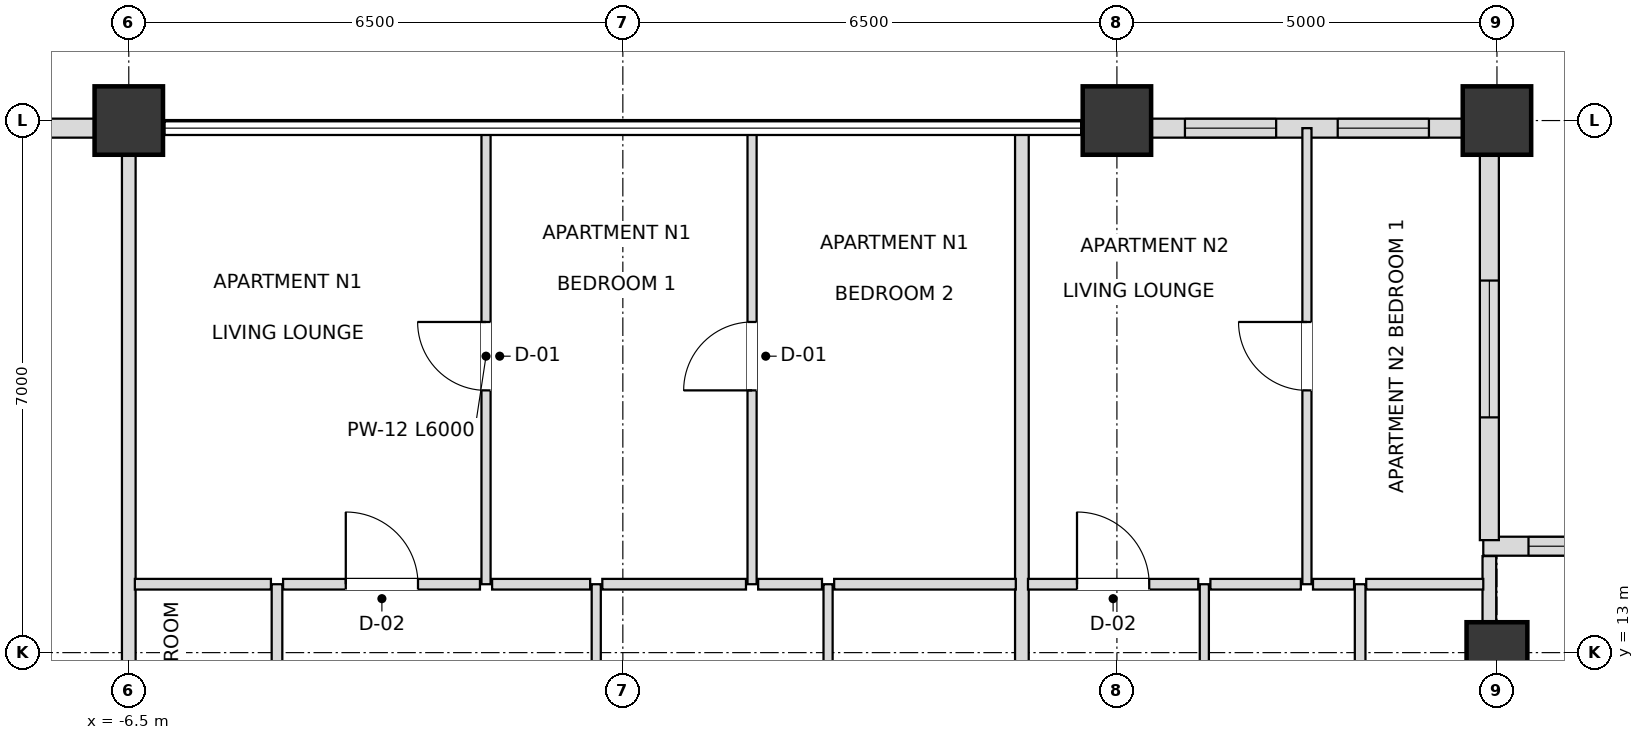
"""IFC4 building model, lengths in metres.
Left out: names, types, materials, properties, quantities, classifications, styles, units other than length and angle.
Written with IfcOpenShell. Run it as: python <this file> out.ifc"""

import sys

from ifc_helpers import new_model, si_unit, direction, frame, frame_2d, origin, origin_2d, place, context, subcontext, project, spatial, rectangle, extrude, element, fill, save


model = new_model("IFC4")
c1 = context("Model", 3, precision=1e-05, world=origin(), true_north=direction((0.0, 1.0)))
c2 = subcontext(c1, "Body", "Model", "MODEL_VIEW")
j1 = project(units=[si_unit("LENGTHUNIT", "METRE"), si_unit("PLANEANGLEUNIT", "RADIAN")], contexts=[c1])
p1 = place(None, origin())
s1 = spatial("IfcSite", under=j1, at=p1, CompositionType="ELEMENT")
p2 = place(p1, origin())
s2 = spatial("IfcBuilding", under=s1, at=p2, CompositionType="ELEMENT")
p3 = place(p2, frame((0.0, 0.0, 276.3)))
s3 = spatial("IfcBuildingStorey", under=s2, at=p3, CompositionType="ELEMENT", Elevation=276.3)
for number, where, z_axis, x_axis in (
    (1, (11.5, 20.0, 0.0), (0.0, 0.0, 1.0), (1.0, 0.0, 0.0)),
    (2, (6.5, 20.0, 0.0), (0.0, 0.0, 1.0), (1.0, 0.0, 0.0)),
    (3, (-6.5, 20.0, 0.0), (0.0, 0.0, 1.0), (1.0, 0.0, 0.0)),
):
    element("IfcColumn", number, at=place(p3, frame(where, z_axis=z_axis, x_axis=x_axis)), inside=s3, PredefinedType="USERDEFINED", context=c2, shape_type="SweptSolid", body=[
        extrude(rectangle(XDim=0.9, YDim=0.9, at=origin_2d()), origin(), (0.0, 0.0, 1.0), 3.6),
    ])
p4 = place(p3, frame((11.5, 13.0, 0.0), z_axis=(0.0, 0.0, 1.0), x_axis=(1.0, 0.0, 0.0)))
e4 = element("IfcColumn", 4, at=p4, inside=s3, PredefinedType="COLUMN", context=c2, shape_type="SweptSolid", body=[
    extrude(rectangle(XDim=0.8, YDim=0.8, at=origin_2d()), origin(), (0.0, 0.0, 1.0), 3.6),
])
p5 = place(p3, frame((11.055, 19.9, 0.0), z_axis=(0.0, 0.0, 1.0), x_axis=(-1.0, 0.0, 0.0)))
e5 = element("IfcWall", 5, at=p5, inside=s3, PredefinedType="SOLIDWALL", context=c2, shape_type="SweptSolid", body=[
    extrude(rectangle(XDim=4.11, YDim=0.25, at=frame_2d((2.055, 0.0))), origin(), (0.0, 0.0, 1.0), 2.748),
])
p6 = place(p5, frame((0.45, 0.0, 0.72)))
e6 = element("IfcOpeningElement", 6, at=p6, cuts=e5, PredefinedType="OPENING", context=c2, shape_type="SweptSolid", body=[
    extrude(rectangle(XDim=1.2, YDim=1.68, at=frame_2d((0.6, 0.84))), frame((0.0, 0.135, 0.0), z_axis=(0.0, -1.0, 0.0), x_axis=(1.0, 0.0, 0.0)), (0.0, 0.0, 1.0), 0.27),
])
p7 = place(p5, frame((2.46, 0.0, 0.72)))
e7 = element("IfcOpeningElement", 7, at=p7, cuts=e5, PredefinedType="OPENING", context=c2, shape_type="SweptSolid", body=[
    extrude(rectangle(XDim=1.2, YDim=1.68, at=frame_2d((0.6, 0.84))), frame((0.0, 0.135, 0.0), z_axis=(0.0, -1.0, 0.0), x_axis=(1.0, 0.0, 0.0)), (0.0, 0.0, 1.0), 0.27),
])
p8 = place(p3, frame((-6.945, 19.9, 0.0), z_axis=(0.0, 0.0, 1.0), x_axis=(-1.0, 0.0, 0.0)))
e8 = element("IfcWall", 8, at=p8, inside=s3, PredefinedType="SOLIDWALL", context=c2, shape_type="SweptSolid", body=[
    extrude(rectangle(XDim=4.11, YDim=0.25, at=frame_2d((2.055, 0.0))), origin(), (0.0, 0.0, 1.0), 2.748),
])
p9 = place(p8, frame((1.155, 0.0, 0.72)))
e9 = element("IfcOpeningElement", 9, at=p9, cuts=e8, PredefinedType="OPENING", context=c2, shape_type="SweptSolid", body=[
    extrude(rectangle(XDim=1.8, YDim=1.68, at=frame_2d((0.9, 0.84))), frame((0.0, 0.135, 0.0), z_axis=(0.0, -1.0, 0.0), x_axis=(1.0, 0.0, 0.0)), (0.0, 0.0, 1.0), 0.27),
])
p10 = place(p3, frame((16.98, 14.4, 0.0), z_axis=(0.0, 0.0, 1.0), x_axis=(-1.0, 0.0, 0.0)))
e10 = element("IfcWall", 10, at=p10, inside=s3, PredefinedType="SOLIDWALL", context=c2, shape_type="SweptSolid", body=[
    extrude(rectangle(XDim=5.66, YDim=0.25, at=frame_2d((2.83, 0.0))), origin(), (0.0, 0.0, 1.0), 2.748),
])
p11 = place(p10, frame((0.595, 0.0, 0.72)))
e11 = element("IfcOpeningElement", 11, at=p11, cuts=e10, PredefinedType="OPENING", context=c2, shape_type="SweptSolid", body=[
    extrude(rectangle(XDim=1.8, YDim=1.68, at=frame_2d((0.9, 0.84))), frame((0.0, 0.135, 0.0), z_axis=(0.0, -1.0, 0.0), x_axis=(1.0, 0.0, 0.0)), (0.0, 0.0, 1.0), 0.27),
])
p12 = place(p10, frame((3.265, 0.0, 0.72)))
e12 = element("IfcOpeningElement", 12, at=p12, cuts=e10, PredefinedType="OPENING", context=c2, shape_type="SweptSolid", body=[
    extrude(rectangle(XDim=1.8, YDim=1.68, at=frame_2d((0.9, 0.84))), frame((0.0, 0.135, 0.0), z_axis=(0.0, -1.0, 0.0), x_axis=(1.0, 0.0, 0.0)), (0.0, 0.0, 1.0), 0.27),
])
p13 = place(p3, frame((11.4, 14.48, 0.0), z_axis=(0.0, 0.0, 1.0), x_axis=(0.0, 1.0, 0.0)))
e13 = element("IfcWall", 13, at=p13, inside=s3, PredefinedType="SOLIDWALL", context=c2, shape_type="SweptSolid", body=[
    extrude(rectangle(XDim=5.34, YDim=0.25, at=frame_2d((2.67, 0.0))), origin(), (0.0, 0.0, 1.0), 2.748),
])
p14 = place(p13, frame((1.615, 0.0, 0.72)))
e14 = element("IfcOpeningElement", 14, at=p14, cuts=e13, PredefinedType="OPENING", context=c2, shape_type="SweptSolid", body=[
    extrude(rectangle(XDim=1.8, YDim=1.68, at=frame_2d((0.9, 0.84))), frame((0.0, 0.135, 0.0), z_axis=(0.0, -1.0, 0.0), x_axis=(1.0, 0.0, 0.0)), (0.0, 0.0, 1.0), 0.27),
])
p15 = place(p3, frame((-6.5, 9.2, 0.0), z_axis=(0.0, 0.0, 1.0), x_axis=(0.0, 1.0, 0.0)))
e15 = element("IfcWall", 15, at=p15, inside=s3, PredefinedType="PARTITIONING", context=c2, shape_type="SweptSolid", body=[
    extrude(rectangle(XDim=10.7, YDim=0.18, at=frame_2d((5.35, 0.0))), origin(), (0.0, 0.0, 1.0), 2.826),
])
p16 = place(p3, frame((-4.55, 9.2, 0.0), z_axis=(0.0, 0.0, 1.0), x_axis=(0.0, 1.0, 0.0)))
e16 = element("IfcWall", 16, at=p16, inside=s3, PredefinedType="PARTITIONING", context=c2, shape_type="SweptSolid", body=[
    extrude(rectangle(XDim=4.7, YDim=0.14, at=frame_2d((2.35, 0.0))), origin(), (0.0, 0.0, 1.0), 3.38),
])
p17 = place(p16, frame((1.9, 0.0, 0.0)))
e17 = element("IfcOpeningElement", 17, at=p17, cuts=e16, PredefinedType="OPENING", context=c2, shape_type="SweptSolid", body=[
    extrude(rectangle(XDim=0.9, YDim=2.1, at=frame_2d((0.45, 1.05))), frame((0.0, 0.08, 0.0), z_axis=(0.0, -1.0, 0.0), x_axis=(1.0, 0.0, 0.0)), (0.0, 0.0, 1.0), 0.16),
])
p18 = place(p3, frame((-1.8, 13.9, 0.0), z_axis=(0.0, 0.0, 1.0), x_axis=(0.0, 1.0, 0.0)))
e18 = element("IfcWall", 18, at=p18, inside=s3, PredefinedType="PARTITIONING", context=c2, shape_type="SweptSolid", body=[
    extrude(rectangle(XDim=6.0, YDim=0.12, at=frame_2d((3.0, 0.0))), origin(), (0.0, 0.0, 1.0), 3.018),
])
p19 = place(p18, frame((2.55, 0.0, 0.0)))
e19 = element("IfcOpeningElement", 19, at=p19, cuts=e18, PredefinedType="OPENING", context=c2, shape_type="SweptSolid", body=[
    extrude(rectangle(XDim=0.9, YDim=2.1, at=frame_2d((0.45, 1.05))), frame((0.0, 0.07, 0.0), z_axis=(0.0, -1.0, 0.0), x_axis=(1.0, 0.0, 0.0)), (0.0, 0.0, 1.0), 0.14),
])
p20 = place(p3, frame((-0.35, 9.2, 0.0), z_axis=(0.0, 0.0, 1.0), x_axis=(0.0, 1.0, 0.0)))
e20 = element("IfcWall", 20, at=p20, inside=s3, PredefinedType="PARTITIONING", context=c2, shape_type="SweptSolid", body=[
    extrude(rectangle(XDim=4.7, YDim=0.12, at=frame_2d((2.35, 0.0))), origin(), (0.0, 0.0, 1.0), 3.38),
])
p21 = place(p20, frame((1.875, 0.0, 0.0)))
e21 = element("IfcOpeningElement", 21, at=p21, cuts=e20, PredefinedType="OPENING", context=c2, shape_type="SweptSolid", body=[
    extrude(rectangle(XDim=0.95, YDim=2.1, at=frame_2d((0.475, 1.05))), frame((0.0, 0.07, 0.0), z_axis=(0.0, -1.0, 0.0), x_axis=(1.0, 0.0, 0.0)), (0.0, 0.0, 1.0), 0.14),
])
p22 = place(p3, frame((1.7, 13.9, 0.0), z_axis=(0.0, 0.0, 1.0), x_axis=(0.0, 1.0, 0.0)))
e22 = element("IfcWall", 22, at=p22, inside=s3, PredefinedType="PARTITIONING", context=c2, shape_type="SweptSolid", body=[
    extrude(rectangle(XDim=6.0, YDim=0.12, at=frame_2d((3.0, 0.0))), origin(), (0.0, 0.0, 1.0), 3.018),
])
p23 = place(p22, frame((2.55, 0.0, 0.0)))
e23 = element("IfcOpeningElement", 23, at=p23, cuts=e22, PredefinedType="OPENING", context=c2, shape_type="SweptSolid", body=[
    extrude(rectangle(XDim=0.9, YDim=2.1, at=frame_2d((0.45, 1.05))), frame((0.0, 0.07, 0.0), z_axis=(0.0, -1.0, 0.0), x_axis=(1.0, 0.0, 0.0)), (0.0, 0.0, 1.0), 0.14),
])
p24 = place(p3, frame((2.7, 9.2, 0.0), z_axis=(0.0, 0.0, 1.0), x_axis=(0.0, 1.0, 0.0)))
e24 = element("IfcWall", 24, at=p24, inside=s3, PredefinedType="PARTITIONING", context=c2, shape_type="SweptSolid", body=[
    extrude(rectangle(XDim=4.7, YDim=0.12, at=frame_2d((2.35, 0.0))), origin(), (0.0, 0.0, 1.0), 3.38),
])
p25 = place(p24, frame((1.9, 0.0, 0.0)))
e25 = element("IfcOpeningElement", 25, at=p25, cuts=e24, PredefinedType="OPENING", context=c2, shape_type="SweptSolid", body=[
    extrude(rectangle(XDim=0.9, YDim=2.1, at=frame_2d((0.45, 1.05))), frame((0.0, 0.07, 0.0), z_axis=(0.0, -1.0, 0.0), x_axis=(1.0, 0.0, 0.0)), (0.0, 0.0, 1.0), 0.14),
])
p26 = place(p3, frame((5.25, 9.2, 0.0), z_axis=(0.0, 0.0, 1.0), x_axis=(0.0, 1.0, 0.0)))
e26 = element("IfcWall", 26, at=p26, inside=s3, PredefinedType="PARTITIONING", context=c2, shape_type="SweptSolid", body=[
    extrude(rectangle(XDim=10.7, YDim=0.18, at=frame_2d((5.35, 0.0))), origin(), (0.0, 0.0, 1.0), 3.018),
])
p27 = place(p3, frame((7.65, 9.2, 0.0), z_axis=(0.0, 0.0, 1.0), x_axis=(0.0, 1.0, 0.0)))
e27 = element("IfcWall", 27, at=p27, inside=s3, PredefinedType="PARTITIONING", context=c2, shape_type="SweptSolid", body=[
    extrude(rectangle(XDim=4.7, YDim=0.12, at=frame_2d((2.35, 0.0))), origin(), (0.0, 0.0, 1.0), 2.826),
])
p28 = place(p27, frame((1.875, 0.0, 0.0)))
e28 = element("IfcOpeningElement", 28, at=p28, cuts=e27, PredefinedType="OPENING", context=c2, shape_type="SweptSolid", body=[
    extrude(rectangle(XDim=0.95, YDim=2.1, at=frame_2d((0.475, 1.05))), frame((0.0, 0.07, 0.0), z_axis=(0.0, -1.0, 0.0), x_axis=(1.0, 0.0, 0.0)), (0.0, 0.0, 1.0), 0.14),
])
p29 = place(p3, frame((9.0, 13.9, 0.0), z_axis=(0.0, 0.0, 1.0), x_axis=(0.0, 1.0, 0.0)))
e29 = element("IfcWall", 29, at=p29, inside=s3, PredefinedType="PARTITIONING", context=c2, shape_type="SweptSolid", body=[
    extrude(rectangle(XDim=6.0, YDim=0.12, at=frame_2d((3.0, 0.0))), origin(), (0.0, 0.0, 1.0), 3.38),
])
p30 = place(p29, frame((2.55, 0.0, 0.0)))
e30 = element("IfcOpeningElement", 30, at=p30, cuts=e29, PredefinedType="OPENING", context=c2, shape_type="SweptSolid", body=[
    extrude(rectangle(XDim=0.9, YDim=2.1, at=frame_2d((0.45, 1.05))), frame((0.0, 0.07, 0.0), z_axis=(0.0, -1.0, 0.0), x_axis=(1.0, 0.0, 0.0)), (0.0, 0.0, 1.0), 0.14),
])
p31 = place(p3, frame((9.7, 9.2, 0.0), z_axis=(0.0, 0.0, 1.0), x_axis=(0.0, 1.0, 0.0)))
e31 = element("IfcWall", 31, at=p31, inside=s3, PredefinedType="PARTITIONING", context=c2, shape_type="SweptSolid", body=[
    extrude(rectangle(XDim=4.7, YDim=0.14, at=frame_2d((2.35, 0.0))), origin(), (0.0, 0.0, 1.0), 2.826),
])
p32 = place(p31, frame((1.9, 0.0, 0.0)))
e32 = element("IfcOpeningElement", 32, at=p32, cuts=e31, PredefinedType="OPENING", context=c2, shape_type="SweptSolid", body=[
    extrude(rectangle(XDim=0.9, YDim=2.1, at=frame_2d((0.45, 1.05))), frame((0.0, 0.08, 0.0), z_axis=(0.0, -1.0, 0.0), x_axis=(1.0, 0.0, 0.0)), (0.0, 0.0, 1.0), 0.16),
])
p33 = place(p3, frame((11.4, 9.2, 0.0), z_axis=(0.0, 0.0, 1.0), x_axis=(0.0, 1.0, 0.0)))
e33 = element("IfcWall", 33, at=p33, inside=s3, PredefinedType="PARTITIONING", context=c2, shape_type="SweptSolid", body=[
    extrude(rectangle(XDim=5.07, YDim=0.18, at=frame_2d((2.535, 0.0))), origin(), (0.0, 0.0, 1.0), 2.748),
])
p34 = place(p3, frame((-6.42, 13.9, 0.0), z_axis=(0.0, 0.0, 1.0), x_axis=(1.0, 0.0, 0.0)))
e34 = element("IfcWall", 34, at=p34, inside=s3, PredefinedType="PARTITIONING", context=c2, shape_type="SweptSolid", body=[
    extrude(rectangle(XDim=1.79, YDim=0.14, at=frame_2d((0.895, 0.0))), origin(), (0.0, 0.0, 1.0), 3.38),
])
p35 = place(p3, frame((-4.47, 13.9, 0.0), z_axis=(0.0, 0.0, 1.0), x_axis=(1.0, 0.0, 0.0)))
e35 = element("IfcWall", 35, at=p35, inside=s3, PredefinedType="PARTITIONING", context=c2, shape_type="SweptSolid", body=[
    extrude(rectangle(XDim=2.59, YDim=0.14, at=frame_2d((1.295, 0.0))), origin(), (0.0, 0.0, 1.0), 3.38),
])
p36 = place(p35, frame((0.825, 0.0, 0.0)))
e36 = element("IfcOpeningElement", 36, at=p36, cuts=e35, PredefinedType="OPENING", context=c2, shape_type="SweptSolid", body=[
    extrude(rectangle(XDim=0.95, YDim=2.1, at=frame_2d((0.475, 1.05))), frame((0.0, 0.08, 0.0), z_axis=(0.0, -1.0, 0.0), x_axis=(1.0, 0.0, 0.0)), (0.0, 0.0, 1.0), 0.16),
])
p37 = place(p3, frame((-1.72, 13.9, 0.0), z_axis=(0.0, 0.0, 1.0), x_axis=(1.0, 0.0, 0.0)))
e37 = element("IfcWall", 37, at=p37, inside=s3, PredefinedType="PARTITIONING", context=c2, shape_type="SweptSolid", body=[
    extrude(rectangle(XDim=1.29, YDim=0.14, at=frame_2d((0.645, 0.0))), origin(), (0.0, 0.0, 1.0), 3.38),
])
p38 = place(p3, frame((-0.27, 13.9, 0.0), z_axis=(0.0, 0.0, 1.0), x_axis=(1.0, 0.0, 0.0)))
e38 = element("IfcWall", 38, at=p38, inside=s3, PredefinedType="PARTITIONING", context=c2, shape_type="SweptSolid", body=[
    extrude(rectangle(XDim=1.89, YDim=0.14, at=frame_2d((0.945, 0.0))), origin(), (0.0, 0.0, 1.0), 3.38),
])
p39 = place(p3, frame((1.78, 13.9, 0.0), z_axis=(0.0, 0.0, 1.0), x_axis=(1.0, 0.0, 0.0)))
e39 = element("IfcWall", 39, at=p39, inside=s3, PredefinedType="PARTITIONING", context=c2, shape_type="SweptSolid", body=[
    extrude(rectangle(XDim=0.84, YDim=0.14, at=frame_2d((0.42, 0.0))), origin(), (0.0, 0.0, 1.0), 3.38),
])
p40 = place(p3, frame((2.78, 13.9, 0.0), z_axis=(0.0, 0.0, 1.0), x_axis=(1.0, 0.0, 0.0)))
e40 = element("IfcWall", 40, at=p40, inside=s3, PredefinedType="PARTITIONING", context=c2, shape_type="SweptSolid", body=[
    extrude(rectangle(XDim=2.39, YDim=0.14, at=frame_2d((1.195, 0.0))), origin(), (0.0, 0.0, 1.0), 3.38),
])
p41 = place(p3, frame((5.33, 13.9, 0.0), z_axis=(0.0, 0.0, 1.0), x_axis=(1.0, 0.0, 0.0)))
e41 = element("IfcWall", 41, at=p41, inside=s3, PredefinedType="PARTITIONING", context=c2, shape_type="SweptSolid", body=[
    extrude(rectangle(XDim=2.24, YDim=0.14, at=frame_2d((1.12, 0.0))), origin(), (0.0, 0.0, 1.0), 2.826),
])
p42 = place(p41, frame((0.645, 0.0, 0.0)))
e42 = element("IfcOpeningElement", 42, at=p42, cuts=e41, PredefinedType="OPENING", context=c2, shape_type="SweptSolid", body=[
    extrude(rectangle(XDim=0.95, YDim=2.1, at=frame_2d((0.475, 1.05))), frame((0.0, 0.08, 0.0), z_axis=(0.0, -1.0, 0.0), x_axis=(1.0, 0.0, 0.0)), (0.0, 0.0, 1.0), 0.16),
])
p43 = place(p3, frame((7.73, 13.9, 0.0), z_axis=(0.0, 0.0, 1.0), x_axis=(1.0, 0.0, 0.0)))
e43 = element("IfcWall", 43, at=p43, inside=s3, PredefinedType="PARTITIONING", context=c2, shape_type="SweptSolid", body=[
    extrude(rectangle(XDim=1.19, YDim=0.14, at=frame_2d((0.595, 0.0))), origin(), (0.0, 0.0, 1.0), 3.38),
])
p44 = place(p3, frame((9.08, 13.9, 0.0), z_axis=(0.0, 0.0, 1.0), x_axis=(1.0, 0.0, 0.0)))
e44 = element("IfcWall", 44, at=p44, inside=s3, PredefinedType="PARTITIONING", context=c2, shape_type="SweptSolid", body=[
    extrude(rectangle(XDim=0.54, YDim=0.14, at=frame_2d((0.27, 0.0))), origin(), (0.0, 0.0, 1.0), 3.38),
])
p45 = place(p3, frame((9.78, 13.9, 0.0), z_axis=(0.0, 0.0, 1.0), x_axis=(1.0, 0.0, 0.0)))
e45 = element("IfcWall", 45, at=p45, inside=s3, PredefinedType="PARTITIONING", context=c2, shape_type="SweptSolid", body=[
    extrude(rectangle(XDim=1.54, YDim=0.14, at=frame_2d((0.77, 0.0))), origin(), (0.0, 0.0, 1.0), 3.38),
])
p46 = place(p6, origin())
e46 = element("IfcWindow", 46, at=p46, inside=s3, PartitioningType="SINGLE_PANEL", PredefinedType="WINDOW", context=c2, shape_type="SweptSolid", body=[
    extrude(rectangle(XDim=1.2, YDim=1.68, at=frame_2d((0.6, 0.84))), frame((0.0, 0.03, 0.0), z_axis=(0.0, -1.0, 0.0), x_axis=(1.0, 0.0, 0.0)), (0.0, 0.0, 1.0), 0.06),
])
fill(e6, e46)
p47 = place(p7, origin())
e47 = element("IfcWindow", 47, at=p47, inside=s3, PartitioningType="SINGLE_PANEL", PredefinedType="WINDOW", context=c2, shape_type="SweptSolid", body=[
    extrude(rectangle(XDim=1.2, YDim=1.68, at=frame_2d((0.6, 0.84))), frame((0.0, 0.03, 0.0), z_axis=(0.0, -1.0, 0.0), x_axis=(1.0, 0.0, 0.0)), (0.0, 0.0, 1.0), 0.06),
])
fill(e7, e47)
p48 = place(p12, origin())
e48 = element("IfcWindow", 48, at=p48, inside=s3, PartitioningType="SINGLE_PANEL", PredefinedType="WINDOW", context=c2, shape_type="SweptSolid", body=[
    extrude(rectangle(XDim=1.8, YDim=1.68, at=frame_2d((0.9, 0.84))), frame((0.0, 0.03, 0.0), z_axis=(0.0, -1.0, 0.0), x_axis=(1.0, 0.0, 0.0)), (0.0, 0.0, 1.0), 0.06),
])
fill(e12, e48)
p49 = place(p14, origin())
e49 = element("IfcWindow", 49, at=p49, inside=s3, PartitioningType="SINGLE_PANEL", PredefinedType="WINDOW", context=c2, shape_type="SweptSolid", body=[
    extrude(rectangle(XDim=1.8, YDim=1.68, at=frame_2d((0.9, 0.84))), frame((0.0, 0.03, 0.0), z_axis=(0.0, -1.0, 0.0), x_axis=(1.0, 0.0, 0.0)), (0.0, 0.0, 1.0), 0.06),
])
fill(e14, e49)
p50 = place(p36, origin())
e50 = element("IfcDoor", 50, at=p50, inside=s3, OperationType="SINGLE_SWING_LEFT", PredefinedType="DOOR", context=c2, shape_type="SweptSolid", body=[
    extrude(rectangle(XDim=0.95, YDim=2.1, at=frame_2d((0.475, 1.05))), frame((0.0, 0.025, 0.0), z_axis=(0.0, -1.0, 0.0), x_axis=(1.0, 0.0, 0.0)), (0.0, 0.0, 1.0), 0.05),
])
fill(e36, e50)
p51 = place(p19, origin())
e51 = element("IfcDoor", 51, at=p51, inside=s3, OperationType="SINGLE_SWING_RIGHT", PredefinedType="DOOR", context=c2, shape_type="SweptSolid", body=[
    extrude(rectangle(XDim=0.9, YDim=2.1, at=frame_2d((0.45, 1.05))), frame((0.0, 0.025, 0.0), z_axis=(0.0, -1.0, 0.0), x_axis=(1.0, 0.0, 0.0)), (0.0, 0.0, 1.0), 0.05),
])
fill(e19, e51)
p52 = place(p23, origin())
e52 = element("IfcDoor", 52, at=p52, inside=s3, OperationType="SINGLE_SWING_LEFT", PredefinedType="DOOR", context=c2, shape_type="SweptSolid", body=[
    extrude(rectangle(XDim=0.9, YDim=2.1, at=frame_2d((0.45, 1.05))), frame((0.0, 0.025, 0.0), z_axis=(0.0, -1.0, 0.0), x_axis=(1.0, 0.0, 0.0)), (0.0, 0.0, 1.0), 0.05),
])
fill(e23, e52)
p53 = place(p42, origin())
e53 = element("IfcDoor", 53, at=p53, inside=s3, OperationType="SINGLE_SWING_LEFT", PredefinedType="DOOR", context=c2, shape_type="SweptSolid", body=[
    extrude(rectangle(XDim=0.95, YDim=2.1, at=frame_2d((0.475, 1.05))), frame((0.0, 0.025, 0.0), z_axis=(0.0, -1.0, 0.0), x_axis=(1.0, 0.0, 0.0)), (0.0, 0.0, 1.0), 0.05),
])
fill(e42, e53)
p54 = place(p30, origin())
e54 = element("IfcDoor", 54, at=p54, inside=s3, OperationType="SINGLE_SWING_RIGHT", PredefinedType="DOOR", context=c2, shape_type="SweptSolid", body=[
    extrude(rectangle(XDim=0.9, YDim=2.1, at=frame_2d((0.45, 1.05))), frame((0.0, 0.025, 0.0), z_axis=(0.0, -1.0, 0.0), x_axis=(1.0, 0.0, 0.0)), (0.0, 0.0, 1.0), 0.05),
])
fill(e30, e54)
save(model, sys.argv[1])
